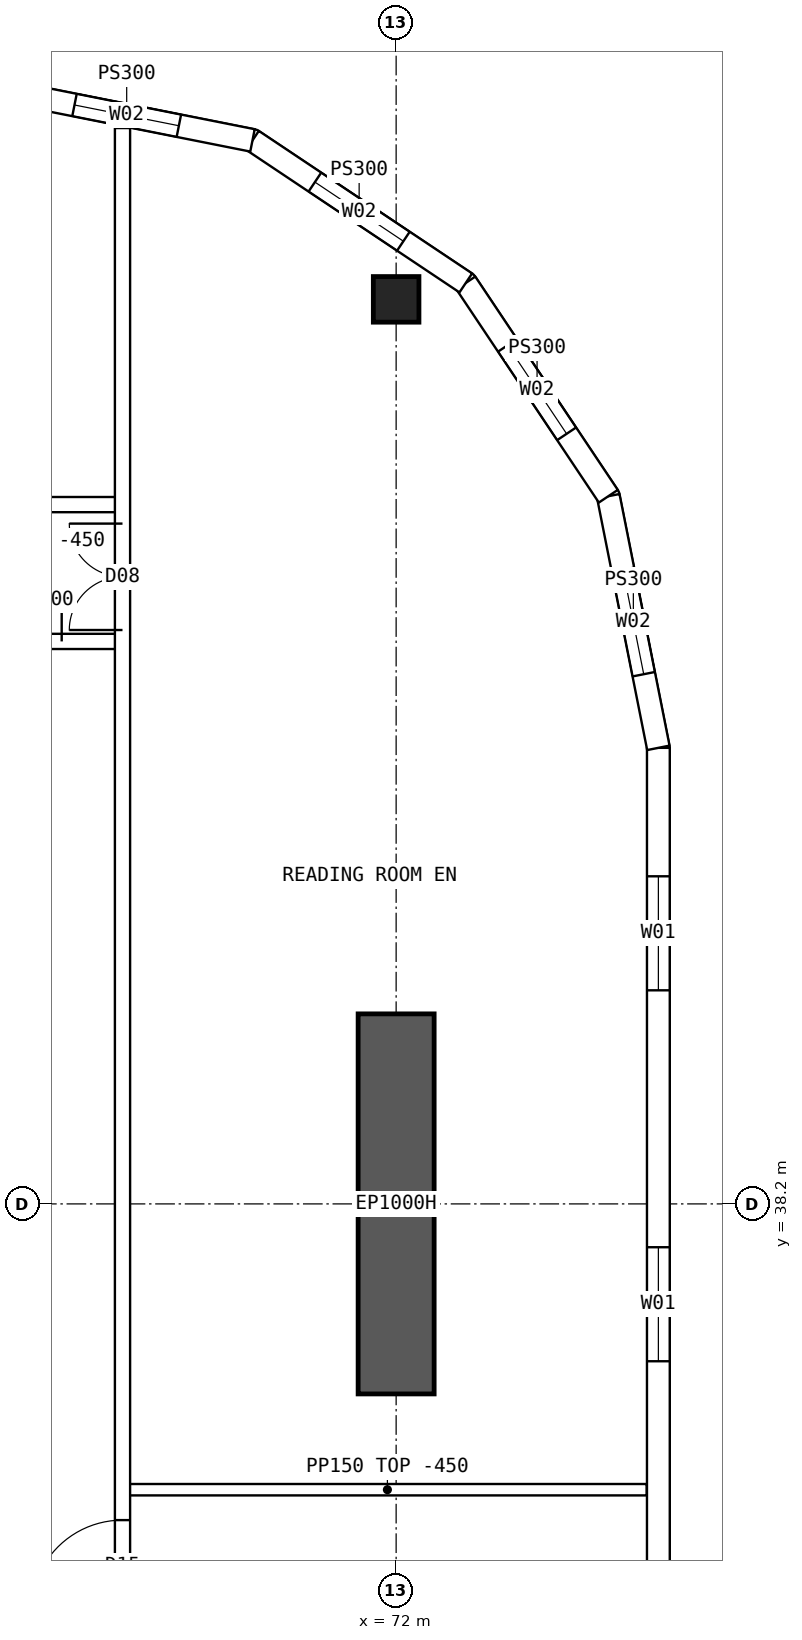
"""IFC4 building model, lengths in metres.
Left out: names, types, materials, properties, quantities, classifications, styles, units other than length and angle.
Written with IfcOpenShell. Run it as: python <this file> out.ifc"""

import sys

from ifc_helpers import new_model, si_unit, direction, frame, frame_2d, origin, origin_2d, place, context, subcontext, project, spatial, polyline, rectangle, hollow_rectangle, outline, extrude, element, fill, save


model = new_model("IFC4")
c1 = context("Model", 3, precision=1e-05, world=origin(), true_north=direction((0.0, 1.0)))
c2 = subcontext(c1, "Body", "Model", "MODEL_VIEW")
j1 = project(units=[si_unit("LENGTHUNIT", "METRE"), si_unit("PLANEANGLEUNIT", "RADIAN")], contexts=[c1])
p1 = place(None, origin())
s1 = spatial("IfcSite", under=j1, at=p1, CompositionType="ELEMENT")
p2 = place(p1, origin())
s2 = spatial("IfcBuilding", under=s1, at=p2, CompositionType="ELEMENT")
p3 = place(p2, frame((0.0, 0.0, 227.8)))
s3 = spatial("IfcBuildingStorey", under=s2, at=p3, CompositionType="ELEMENT", Elevation=227.8)
p4 = place(p3, frame((72.0, 50.1, 0.0), z_axis=(0.0, 0.0, 1.0), x_axis=(1.0, 0.0, 0.0)))
e1 = element("IfcColumn", 1, at=p4, inside=s3, PredefinedType="COLUMN", context=c2, shape_type="SweptSolid", body=[
    extrude(hollow_rectangle(XDim=0.6, YDim=0.6, WallThickness=0.06, at=origin_2d()), origin(), (0.0, 0.0, 1.0), 3.75),
])
p5 = place(p3, frame((72.0, 35.7, 0.0), z_axis=(0.0, 0.0, 1.0), x_axis=(0.0, 1.0, 0.0)))
e2 = element("IfcWall", 2, at=p5, inside=s3, PredefinedType="SHEAR", context=c2, shape_type="SweptSolid", body=[
    extrude(rectangle(XDim=5.0, YDim=1.0, at=frame_2d((2.5, 0.0))), origin(), (0.0, 0.0, 1.0), 3.75),
])
p6 = place(p3, frame((75.45, 19.8, 0.0), z_axis=(0.0, 0.0, 1.0), x_axis=(0.0, 1.0, 0.0)))
e3 = element("IfcWall", 3, at=p6, inside=s3, PredefinedType="SOLIDWALL", context=c2, shape_type="SweptSolid", body=[
    extrude(outline(polyline([(-0.015, -0.15), (24.415, -0.15), (24.385, 0.15), (0.015, 0.15), (-0.015, -0.15)])), origin(), (0.0, 0.0, 1.0), 3.3),
])
p7 = place(p6, frame((1.69, 0.0, 0.9)))
e4 = element("IfcOpeningElement", 4, at=p7, cuts=e3, PredefinedType="OPENING", context=c2, shape_type="SweptSolid", body=[
    extrude(rectangle(XDim=1.5, YDim=2.0, at=frame_2d((0.75, 1.0))), frame((0.0, 0.16, 0.0), z_axis=(0.0, -1.0, 0.0), x_axis=(1.0, 0.0, 0.0)), (0.0, 0.0, 1.0), 0.32),
])
p8 = place(p6, frame((6.57, 0.0, 0.9)))
e5 = element("IfcOpeningElement", 5, at=p8, cuts=e3, PredefinedType="OPENING", context=c2, shape_type="SweptSolid", body=[
    extrude(rectangle(XDim=1.5, YDim=2.0, at=frame_2d((0.75, 1.0))), frame((0.0, 0.16, 0.0), z_axis=(0.0, -1.0, 0.0), x_axis=(1.0, 0.0, 0.0)), (0.0, 0.0, 1.0), 0.32),
])
p9 = place(p6, frame((11.45, 0.0, 0.9)))
e6 = element("IfcOpeningElement", 6, at=p9, cuts=e3, PredefinedType="OPENING", context=c2, shape_type="SweptSolid", body=[
    extrude(rectangle(XDim=1.5, YDim=2.0, at=frame_2d((0.75, 1.0))), frame((0.0, 0.16, 0.0), z_axis=(0.0, -1.0, 0.0), x_axis=(1.0, 0.0, 0.0)), (0.0, 0.0, 1.0), 0.32),
])
p10 = place(p6, frame((16.33, 0.0, 0.9)))
e7 = element("IfcOpeningElement", 7, at=p10, cuts=e3, PredefinedType="OPENING", context=c2, shape_type="SweptSolid", body=[
    extrude(rectangle(XDim=1.5, YDim=2.0, at=frame_2d((0.75, 1.0))), frame((0.0, 0.16, 0.0), z_axis=(0.0, -1.0, 0.0), x_axis=(1.0, 0.0, 0.0)), (0.0, 0.0, 1.0), 0.32),
])
p11 = place(p6, frame((21.21, 0.0, 0.9)))
e8 = element("IfcOpeningElement", 8, at=p11, cuts=e3, PredefinedType="OPENING", context=c2, shape_type="SweptSolid", body=[
    extrude(rectangle(XDim=1.5, YDim=2.0, at=frame_2d((0.75, 1.0))), frame((0.0, 0.16, 0.0), z_axis=(0.0, -1.0, 0.0), x_axis=(1.0, 0.0, 0.0)), (0.0, 0.0, 1.0), 0.32),
])
p12 = place(p3, frame((75.45, 44.2, 0.0), z_axis=(0.0, 0.0, 1.0), x_axis=(-0.19508664885, 0.980786011034, 0.0)))
e9 = element("IfcWall", 9, at=p12, inside=s3, PredefinedType="SOLIDWALL", context=c2, shape_type="SweptSolid", body=[
    extrude(outline(polyline([(-0.015, -0.15), (3.405, -0.15), (3.345, 0.15), (0.015, 0.15), (-0.015, -0.15)])), origin(), (0.0, 0.0, 1.0), 3.3),
])
p13 = place(p12, frame((0.988, 0.0, 0.9)))
e10 = element("IfcOpeningElement", 10, at=p13, cuts=e9, PredefinedType="OPENING", context=c2, shape_type="SweptSolid", body=[
    extrude(rectangle(XDim=1.4, YDim=1.8, at=frame_2d((0.7, 0.9))), frame((0.0, 0.16, 0.0), z_axis=(0.0, -1.0, 0.0), x_axis=(1.0, 0.0, 0.0)), (0.0, 0.0, 1.0), 0.32),
])
p14 = place(p3, frame((74.792, 47.51, 0.0), z_axis=(0.0, 0.0, 1.0), x_axis=(-0.555567969291, 0.831471124873, 0.0)))
e11 = element("IfcWall", 11, at=p14, inside=s3, PredefinedType="SOLIDWALL", context=c2, shape_type="SweptSolid", body=[
    extrude(outline(polyline([(-0.03, -0.15), (3.405, -0.15), (3.345, 0.15), (0.03, 0.15), (-0.03, -0.15)])), origin(), (0.0, 0.0, 1.0), 3.3),
])
p15 = place(p14, frame((0.988, 0.0, 0.9)))
e12 = element("IfcOpeningElement", 12, at=p15, cuts=e11, PredefinedType="OPENING", context=c2, shape_type="SweptSolid", body=[
    extrude(rectangle(XDim=1.4, YDim=1.8, at=frame_2d((0.7, 0.9))), frame((0.0, 0.16, 0.0), z_axis=(0.0, -1.0, 0.0), x_axis=(1.0, 0.0, 0.0)), (0.0, 0.0, 1.0), 0.32),
])
p16 = place(p3, frame((72.917, 50.316, 0.0), z_axis=(0.0, 0.0, 1.0), x_axis=(-0.831460037396, 0.555584562613, 0.0)))
e13 = element("IfcWall", 13, at=p16, inside=s3, PredefinedType="SOLIDWALL", context=c2, shape_type="SweptSolid", body=[
    extrude(outline(polyline([(-0.03, -0.15), (3.405, -0.15), (3.345, 0.15), (0.03, 0.15), (-0.03, -0.15)])), origin(), (0.0, 0.0, 1.0), 3.3),
])
p17 = place(p16, frame((0.988, 0.0, 0.9)))
e14 = element("IfcOpeningElement", 14, at=p17, cuts=e13, PredefinedType="OPENING", context=c2, shape_type="SweptSolid", body=[
    extrude(rectangle(XDim=1.4, YDim=1.8, at=frame_2d((0.7, 0.9))), frame((0.0, 0.16, 0.0), z_axis=(0.0, -1.0, 0.0), x_axis=(1.0, 0.0, 0.0)), (0.0, 0.0, 1.0), 0.32),
])
p18 = place(p3, frame((70.11, 52.192, 0.0), z_axis=(0.0, 0.0, 1.0), x_axis=(-0.98078325777, 0.195100490205, 0.0)))
e15 = element("IfcWall", 15, at=p18, inside=s3, PredefinedType="SOLIDWALL", context=c2, shape_type="SweptSolid", body=[
    extrude(outline(polyline([(-0.03, -0.15), (3.405, -0.15), (3.345, 0.15), (0.03, 0.15), (-0.03, -0.15)])), origin(), (0.0, 0.0, 1.0), 3.3),
])
p19 = place(p18, frame((0.988, 0.0, 0.9)))
e16 = element("IfcOpeningElement", 16, at=p19, cuts=e15, PredefinedType="OPENING", context=c2, shape_type="SweptSolid", body=[
    extrude(rectangle(XDim=1.4, YDim=1.8, at=frame_2d((0.7, 0.9))), frame((0.0, 0.16, 0.0), z_axis=(0.0, -1.0, 0.0), x_axis=(1.0, 0.0, 0.0)), (0.0, 0.0, 1.0), 0.32),
])
p20 = place(p3, frame((66.35, 47.4, 0.0), z_axis=(0.0, 0.0, 1.0), x_axis=(1.0, 0.0, 0.0)))
e17 = element("IfcWall", 17, at=p20, inside=s3, PredefinedType="SOLIDWALL", context=c2, shape_type="SweptSolid", body=[
    extrude(rectangle(XDim=2.05, YDim=0.2, at=frame_2d((1.025, 0.0))), origin(), (0.0, 0.0, 1.0), 3.3),
])
p21 = place(p20, frame((0.2, 0.0, 0.0)))
e18 = element("IfcOpeningElement", 18, at=p21, cuts=e17, PredefinedType="OPENING", context=c2, shape_type="SweptSolid", body=[
    extrude(rectangle(XDim=0.9, YDim=2.1, at=frame_2d((0.45, 1.05))), frame((0.0, 0.11, 0.0), z_axis=(0.0, -1.0, 0.0), x_axis=(1.0, 0.0, 0.0)), (0.0, 0.0, 1.0), 0.22),
])
p22 = place(p3, frame((66.35, 45.6, 0.0), z_axis=(0.0, 0.0, 1.0), x_axis=(1.0, 0.0, 0.0)))
e19 = element("IfcWall", 19, at=p22, inside=s3, PredefinedType="SOLIDWALL", context=c2, shape_type="SweptSolid", body=[
    extrude(rectangle(XDim=2.05, YDim=0.2, at=frame_2d((1.025, 0.0))), origin(), (0.0, 0.0, 1.0), 3.3),
])
p23 = place(p22, frame((0.05, 0.0, 0.0)))
e20 = element("IfcOpeningElement", 20, at=p23, cuts=e19, PredefinedType="OPENING", context=c2, shape_type="SweptSolid", body=[
    extrude(rectangle(XDim=1.2, YDim=2.1, at=frame_2d((0.6, 1.05))), frame((0.0, 0.11, 0.0), z_axis=(0.0, -1.0, 0.0), x_axis=(1.0, 0.0, 0.0)), (0.0, 0.0, 1.0), 0.22),
])
p24 = place(p3, frame((68.4, 11.646, 0.0), z_axis=(0.0, 0.0, 1.0), x_axis=(0.0, 1.0, 0.0)))
e21 = element("IfcWall", 21, at=p24, inside=s3, PredefinedType="SOLIDWALL", context=c2, shape_type="SweptSolid", body=[
    extrude(rectangle(XDim=40.708, YDim=0.2, at=frame_2d((20.354, 0.0))), origin(), (0.0, 0.0, 1.0), 3.3),
])
p25 = place(p24, frame((13.434, 0.0, 0.0)))
e22 = element("IfcOpeningElement", 22, at=p25, cuts=e21, PredefinedType="OPENING", context=c2, shape_type="SweptSolid", body=[
    extrude(rectangle(XDim=1.2, YDim=2.1, at=frame_2d((0.6, 1.05))), frame((0.0, 0.11, 0.0), z_axis=(0.0, -1.0, 0.0), x_axis=(1.0, 0.0, 0.0)), (0.0, 0.0, 1.0), 0.22),
])
p26 = place(p24, frame((21.194, 0.0, 0.0)))
e23 = element("IfcOpeningElement", 23, at=p26, cuts=e21, PredefinedType="OPENING", context=c2, shape_type="SweptSolid", body=[
    extrude(rectangle(XDim=1.2, YDim=2.1, at=frame_2d((0.6, 1.05))), frame((0.0, 0.11, 0.0), z_axis=(0.0, -1.0, 0.0), x_axis=(1.0, 0.0, 0.0)), (0.0, 0.0, 1.0), 0.22),
])
p27 = place(p24, frame((5.104, 0.0, 0.0)))
e24 = element("IfcOpeningElement", 24, at=p27, cuts=e21, PredefinedType="OPENING", context=c2, shape_type="SweptSolid", body=[
    extrude(rectangle(XDim=1.4, YDim=2.1, at=frame_2d((0.7, 1.05))), frame((0.0, 0.11, 0.0), z_axis=(0.0, -1.0, 0.0), x_axis=(1.0, 0.0, 0.0)), (0.0, 0.0, 1.0), 0.22),
])
p28 = place(p24, frame((34.104, 0.0, 0.0)))
e25 = element("IfcOpeningElement", 25, at=p28, cuts=e21, PredefinedType="OPENING", context=c2, shape_type="SweptSolid", body=[
    extrude(rectangle(XDim=1.4, YDim=2.1, at=frame_2d((0.7, 1.05))), frame((0.0, 0.11, 0.0), z_axis=(0.0, -1.0, 0.0), x_axis=(1.0, 0.0, 0.0)), (0.0, 0.0, 1.0), 0.22),
])
p29 = place(p3, frame((68.475, 34.44, 0.0), z_axis=(0.0, 0.0, 1.0), x_axis=(1.0, 0.0, 0.0)))
e26 = element("IfcWall", 26, at=p29, inside=s3, PredefinedType="PARTITIONING", context=c2, shape_type="SweptSolid", body=[
    extrude(outline(polyline([(0.0, 0.0), (6.82, 0.0), (6.82, 3.3), (3.827, 3.3), (3.825, 2.85), (3.227, 2.85), (3.225, 3.3), (0.0, 3.3), (0.0, 0.0)])), frame((0.0, 0.075, 0.0), z_axis=(0.0, -1.0, 0.0), x_axis=(1.0, 0.0, 0.0)), (0.0, 0.0, 1.0), 0.15),
])
p30 = place(p10, origin())
e27 = element("IfcWindow", 27, at=p30, inside=s3, PartitioningType="SINGLE_PANEL", PredefinedType="WINDOW", context=c2, shape_type="SweptSolid", body=[
    extrude(rectangle(XDim=1.5, YDim=2.0, at=frame_2d((0.75, 1.0))), frame((0.0, 0.03, 0.0), z_axis=(0.0, -1.0, 0.0), x_axis=(1.0, 0.0, 0.0)), (0.0, 0.0, 1.0), 0.06),
])
fill(e7, e27)
p31 = place(p11, origin())
e28 = element("IfcWindow", 28, at=p31, inside=s3, PartitioningType="SINGLE_PANEL", PredefinedType="WINDOW", context=c2, shape_type="SweptSolid", body=[
    extrude(rectangle(XDim=1.5, YDim=2.0, at=frame_2d((0.75, 1.0))), frame((0.0, 0.03, 0.0), z_axis=(0.0, -1.0, 0.0), x_axis=(1.0, 0.0, 0.0)), (0.0, 0.0, 1.0), 0.06),
])
fill(e8, e28)
p32 = place(p13, origin())
e29 = element("IfcWindow", 29, at=p32, inside=s3, PartitioningType="SINGLE_PANEL", PredefinedType="WINDOW", context=c2, shape_type="SweptSolid", body=[
    extrude(rectangle(XDim=1.4, YDim=1.8, at=frame_2d((0.7, 0.9))), frame((0.0, 0.03, 0.0), z_axis=(0.0, -1.0, 0.0), x_axis=(1.0, 0.0, 0.0)), (0.0, 0.0, 1.0), 0.06),
])
fill(e10, e29)
p33 = place(p15, origin())
e30 = element("IfcWindow", 30, at=p33, inside=s3, PartitioningType="SINGLE_PANEL", PredefinedType="WINDOW", context=c2, shape_type="SweptSolid", body=[
    extrude(rectangle(XDim=1.4, YDim=1.8, at=frame_2d((0.7, 0.9))), frame((0.0, 0.03, 0.0), z_axis=(0.0, -1.0, 0.0), x_axis=(1.0, 0.0, 0.0)), (0.0, 0.0, 1.0), 0.06),
])
fill(e12, e30)
p34 = place(p17, origin())
e31 = element("IfcWindow", 31, at=p34, inside=s3, PartitioningType="SINGLE_PANEL", PredefinedType="WINDOW", context=c2, shape_type="SweptSolid", body=[
    extrude(rectangle(XDim=1.4, YDim=1.8, at=frame_2d((0.7, 0.9))), frame((0.0, 0.03, 0.0), z_axis=(0.0, -1.0, 0.0), x_axis=(1.0, 0.0, 0.0)), (0.0, 0.0, 1.0), 0.06),
])
fill(e14, e31)
p35 = place(p19, origin())
e32 = element("IfcWindow", 32, at=p35, inside=s3, PartitioningType="SINGLE_PANEL", PredefinedType="WINDOW", context=c2, shape_type="SweptSolid", body=[
    extrude(rectangle(XDim=1.4, YDim=1.8, at=frame_2d((0.7, 0.9))), frame((0.0, 0.03, 0.0), z_axis=(0.0, -1.0, 0.0), x_axis=(1.0, 0.0, 0.0)), (0.0, 0.0, 1.0), 0.06),
])
fill(e16, e32)
p36 = place(p23, origin())
e33 = element("IfcDoor", 33, at=p36, inside=s3, OperationType="DOUBLE_DOOR_SINGLE_SWING", PredefinedType="DOOR", context=c2, shape_type="SweptSolid", body=[
    extrude(rectangle(XDim=1.2, YDim=2.1, at=frame_2d((0.6, 1.05))), frame((0.0, 0.025, 0.0), z_axis=(0.0, -1.0, 0.0), x_axis=(1.0, 0.0, 0.0)), (0.0, 0.0, 1.0), 0.05),
])
fill(e20, e33)
p37 = place(p26, origin())
e34 = element("IfcDoor", 34, at=p37, inside=s3, OperationType="SINGLE_SWING_LEFT", PredefinedType="DOOR", context=c2, shape_type="SweptSolid", body=[
    extrude(rectangle(XDim=1.2, YDim=2.1, at=frame_2d((0.6, 1.05))), frame((0.0, 0.025, 0.0), z_axis=(0.0, -1.0, 0.0), x_axis=(1.0, 0.0, 0.0)), (0.0, 0.0, 1.0), 0.05),
])
fill(e23, e34)
p38 = place(p28, origin())
e35 = element("IfcDoor", 35, at=p38, inside=s3, OperationType="DOUBLE_DOOR_SINGLE_SWING", PredefinedType="DOOR", context=c2, shape_type="SweptSolid", body=[
    extrude(rectangle(XDim=1.4, YDim=2.1, at=frame_2d((0.7, 1.05))), frame((0.0, 0.025, 0.0), z_axis=(0.0, -1.0, 0.0), x_axis=(1.0, 0.0, 0.0)), (0.0, 0.0, 1.0), 0.05),
])
fill(e25, e35)
save(model, sys.argv[1])
